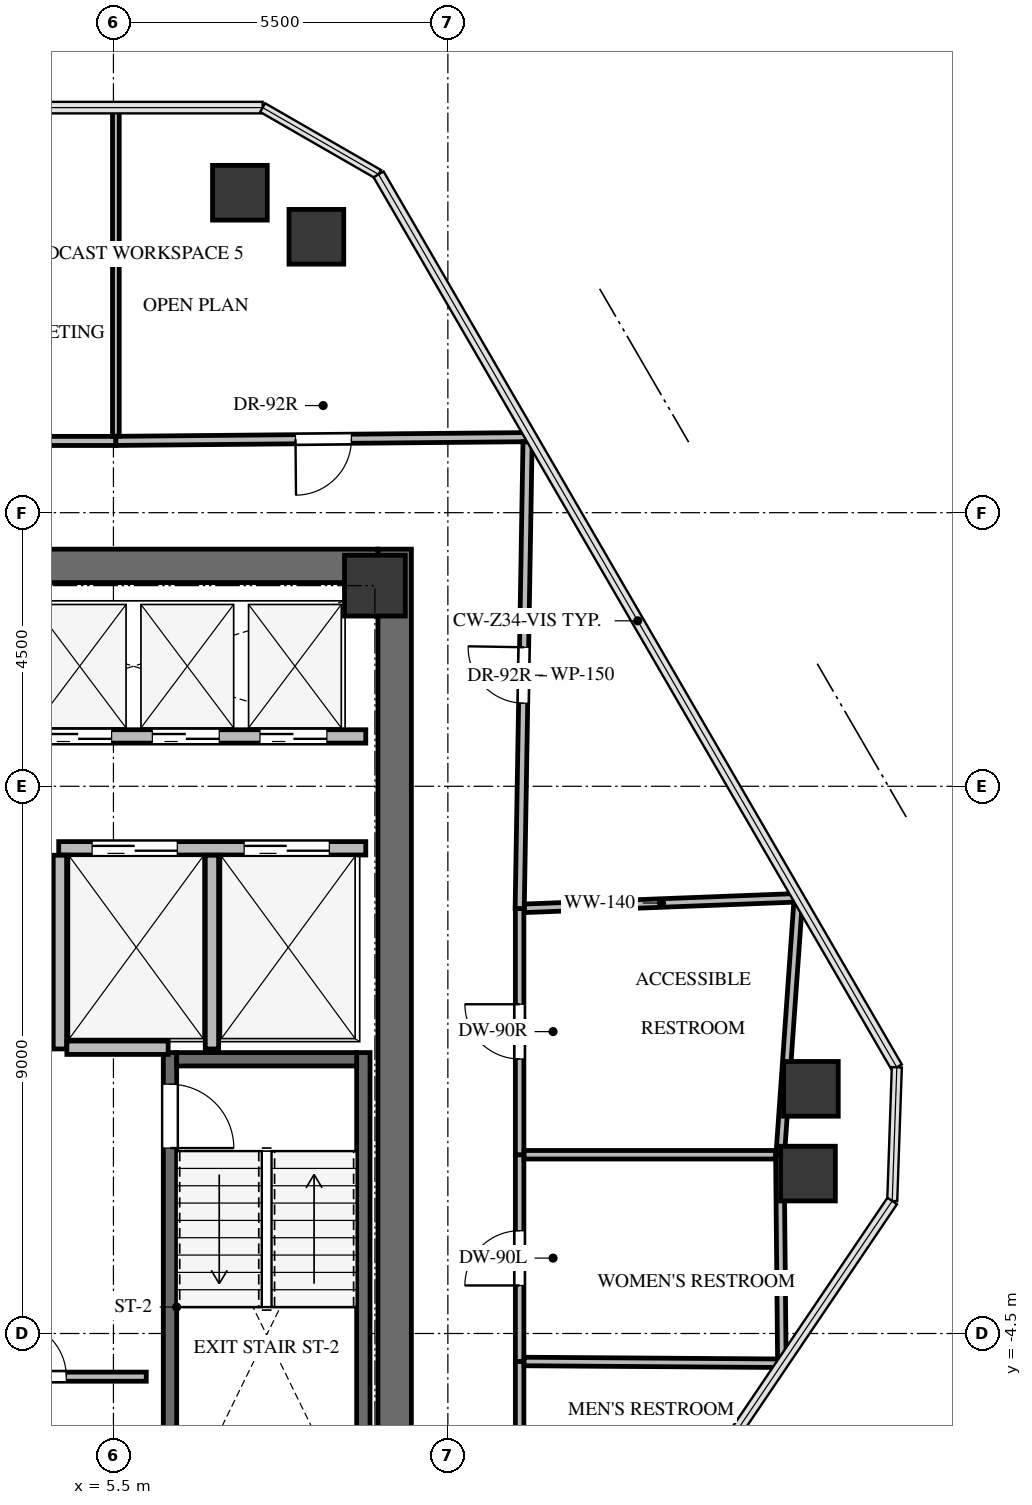
"""IFC4 building model, lengths in metres.
Left out: names, types, materials, properties, quantities, classifications, styles, units other than length and angle.
Written with IfcOpenShell. Run it as: python <this file> out.ifc"""

import sys

from ifc_helpers import new_model, si_unit, direction, frame, frame_2d, origin, origin_2d, place, context, subcontext, project, spatial, rectangle, extrude, source, transform, mapped, element, fill, save


model = new_model("IFC4")
c1 = context("Model", 3, precision=1e-05, world=origin(), true_north=direction((0.0, 1.0)))
c2 = subcontext(c1, "Body", "Model", "MODEL_VIEW")
j1 = project(units=[si_unit("LENGTHUNIT", "METRE"), si_unit("PLANEANGLEUNIT", "RADIAN")], contexts=[c1])
p1 = place(None, origin())
s1 = spatial("IfcSite", under=j1, at=p1, CompositionType="ELEMENT")
p2 = place(p1, origin())
s2 = spatial("IfcBuilding", under=s1, at=p2, CompositionType="ELEMENT")
p3 = place(p2, frame((0.0, 0.0, 251.3)))
s3 = spatial("IfcBuildingStorey", under=s2, at=p3, CompositionType="ELEMENT", Elevation=251.3)
p4 = place(p3, frame((10.125, -8.4, 0.0), z_axis=(0.0, 0.0, 1.0), x_axis=(0.0, 1.0, 0.0)))
e1 = element("IfcWall", 1, at=p4, inside=s3, PredefinedType="SHEAR", context=c2, shape_type="SweptSolid", body=[
    extrude(rectangle(XDim=16.8, YDim=0.55, at=frame_2d((8.4, 0.0))), origin(), (0.0, 0.0, 1.0), 3.4),
])
p5 = place(p3, frame((-9.85, 8.125, 0.0), z_axis=(0.0, 0.0, 1.0), x_axis=(1.0, 0.0, 0.0)))
e2 = element("IfcWall", 2, at=p5, inside=s3, PredefinedType="SHEAR", context=c2, shape_type="SweptSolid", body=[
    extrude(rectangle(XDim=19.7, YDim=0.55, at=frame_2d((9.85, 0.0))), origin(), (0.0, 0.0, 1.0), 3.4),
])
p6 = place(p3, frame((9.61, -7.77, -0.24), z_axis=(0.0, 0.0, 1.0), x_axis=(0.0, 1.0, 0.0)))
e3 = element("IfcWall", 3, at=p6, inside=s3, PredefinedType="SHEAR", context=c2, shape_type="SweptSolid", body=[
    extrude(rectangle(XDim=7.89, YDim=0.22, at=frame_2d((3.945, 0.0))), origin(), (0.0, 0.0, 1.0), 3.4),
])
p7 = place(p3, frame((6.43, 0.12, -0.24), z_axis=(0.0, 0.0, 1.0), x_axis=(0.0, -1.0, 0.0)))
e4 = element("IfcWall", 4, at=p7, inside=s3, PredefinedType="SHEAR", context=c2, shape_type="SweptSolid", body=[
    extrude(rectangle(XDim=7.89, YDim=0.22, at=frame_2d((3.945, 0.0))), origin(), (0.0, 0.0, 1.0), 3.4),
])
p8 = place(p7, frame((0.52, 0.0, 0.0)))
e5 = element("IfcOpeningElement", 5, at=p8, cuts=e4, PredefinedType="OPENING", context=c2, shape_type="SweptSolid", body=[
    extrude(rectangle(XDim=1.05, YDim=2.15, at=frame_2d((0.525, 1.075))), frame((0.0, 0.12, 0.0), z_axis=(0.0, -1.0, 0.0), x_axis=(1.0, 0.0, 0.0)), (0.0, 0.0, 1.0), 0.24),
])
p9 = place(p3, frame((9.5, 0.01, -0.24), z_axis=(0.0, 0.0, 1.0), x_axis=(-1.0, 0.0, 0.0)))
e6 = element("IfcWall", 6, at=p9, inside=s3, PredefinedType="SHEAR", context=c2, shape_type="SweptSolid", body=[
    extrude(rectangle(XDim=2.96, YDim=0.22, at=frame_2d((1.48, 0.0))), origin(), (0.0, 0.0, 1.0), 3.4),
])
m1 = source(origin(), c2, "Body", "SweptSolid", [
    extrude(rectangle(XDim=1.0, YDim=1.0, at=origin_2d()), origin(), (0.0, 0.0, 1.0), 3.4),
])
p10 = place(p3, frame((9.8, 7.8, -0.24), z_axis=(0.0, 0.0, 1.0), x_axis=(1.0, 0.0, 0.0)))
e7 = element("IfcColumn", 7, at=p10, inside=s3, PredefinedType="COLUMN", context=c2, shape_type="MappedRepresentation", body=[
    mapped(m1, transform((0.0, 0.0, 0.0), x_axis=(1.0, 0.0, 0.0), y_axis=(0.0, 1.0, 0.0), z_axis=(0.0, 0.0, 1.0), scale=1.0)),
])
m2 = source(origin(), c2, "Body", "SweptSolid", [
    extrude(rectangle(XDim=0.9, YDim=0.9, at=origin_2d()), origin(), (0.0, 0.0, 1.0), 3.4),
])
for number, where, z_axis, x_axis in (
    (8, (7.58, 14.262, -0.24), (0.0, 0.0, 1.0), (1.0, 0.0, 0.0)),
    (9, (8.837, 13.538, -0.24), (0.0, 0.0, 1.0), (1.0, 0.0, 0.0)),
    (10, (16.97, -0.476, -0.24), (0.0, 0.0, 1.0), (1.0, 0.0, 0.0)),
    (11, (16.922, -1.87, -0.24), (0.0, 0.0, 1.0), (1.0, 0.0, 0.0)),
):
    element("IfcColumn", number, at=place(p3, frame(where, z_axis=z_axis, x_axis=x_axis)), inside=s3, PredefinedType="COLUMN", context=c2, shape_type="MappedRepresentation", body=[
        mapped(m2, transform((0.0, 0.0, 0.0), x_axis=(1.0, 0.0, 0.0), y_axis=(0.0, 1.0, 0.0), z_axis=(0.0, 0.0, 1.0), scale=1.0)),
    ])
p11 = place(p3, frame((4.6, 3.48, 0.0), z_axis=(0.0, 0.0, 1.0), x_axis=(1.0, 0.0, 0.0)))
e12 = element("IfcWall", 12, at=p11, inside=s3, PredefinedType="SOLIDWALL", context=c2, shape_type="SweptSolid", body=[
    extrude(rectangle(XDim=5.05, YDim=0.22, at=frame_2d((2.525, 0.0))), origin(), (0.0, 0.0, 1.0), 3.145),
])
p12 = place(p11, frame((0.55, 0.0, 0.0)))
e13 = element("IfcOpeningElement", 13, at=p12, cuts=e12, PredefinedType="OPENING", context=c2, shape_type="SweptSolid", body=[
    extrude(rectangle(XDim=1.4, YDim=2.15, at=frame_2d((0.7, 1.075))), frame((0.0, 0.12, 0.0), z_axis=(0.0, -1.0, 0.0), x_axis=(1.0, 0.0, 0.0)), (0.0, 0.0, 1.0), 0.24),
])
p13 = place(p11, frame((3.05, 0.0, 0.0)))
e14 = element("IfcOpeningElement", 14, at=p13, cuts=e12, PredefinedType="OPENING", context=c2, shape_type="SweptSolid", body=[
    extrude(rectangle(XDim=1.4, YDim=2.15, at=frame_2d((0.7, 1.075))), frame((0.0, 0.12, 0.0), z_axis=(0.0, -1.0, 0.0), x_axis=(1.0, 0.0, 0.0)), (0.0, 0.0, 1.0), 0.24),
])
for number, where, z_axis, x_axis in (
    (15, (4.62, 0.18, 0.0), (0.0, 0.0, 1.0), (0.0, 1.0, 0.0)),
    (16, (7.12, 0.18, 0.0), (0.0, 0.0, 1.0), (0.0, 1.0, 0.0)),
):
    element("IfcWall", number, at=place(p3, frame(where, z_axis=z_axis, x_axis=x_axis)), inside=s3, PredefinedType="SOLIDWALL", context=c2, shape_type="SweptSolid", body=[
        extrude(rectangle(XDim=3.186, YDim=0.22, at=frame_2d((1.593, 0.0))), origin(), (0.0, 0.0, 1.0), 3.145),
    ])
p14 = place(p3, frame((4.734, 0.2, 0.0), z_axis=(0.0, 0.0, 1.0), x_axis=(1.0, 0.0, 0.0)))
e17 = element("IfcWall", 17, at=p14, inside=s3, PredefinedType="SOLIDWALL", context=c2, shape_type="SweptSolid", body=[
    extrude(rectangle(XDim=1.666, YDim=0.22, at=frame_2d((0.833, 0.0))), origin(), (0.0, 0.0, 1.0), 3.145),
])
p15 = place(p3, frame((2.325, 5.32, 0.0), z_axis=(0.0, 0.0, 1.0), x_axis=(1.0, 0.0, 0.0)))
e18 = element("IfcWall", 18, at=p15, inside=s3, PredefinedType="SOLIDWALL", context=c2, shape_type="SweptSolid", body=[
    extrude(rectangle(XDim=7.325, YDim=0.22, at=frame_2d((3.663, 0.0))), origin(), (0.0, 0.0, 1.0), 3.145),
])
p16 = place(p15, frame((0.275, 0.0, 0.0)))
e19 = element("IfcOpeningElement", 19, at=p16, cuts=e18, PredefinedType="OPENING", context=c2, shape_type="SweptSolid", body=[
    extrude(rectangle(XDim=1.1, YDim=2.15, at=frame_2d((0.55, 1.075))), frame((0.0, 0.12, 0.0), z_axis=(0.0, -1.0, 0.0), x_axis=(1.0, 0.0, 0.0)), (0.0, 0.0, 1.0), 0.24),
])
p17 = place(p15, frame((2.045, 0.0, 0.0)))
e20 = element("IfcOpeningElement", 20, at=p17, cuts=e18, PredefinedType="OPENING", context=c2, shape_type="SweptSolid", body=[
    extrude(rectangle(XDim=1.1, YDim=2.15, at=frame_2d((0.55, 1.075))), frame((0.0, 0.12, 0.0), z_axis=(0.0, -1.0, 0.0), x_axis=(1.0, 0.0, 0.0)), (0.0, 0.0, 1.0), 0.24),
])
p18 = place(p15, frame((3.815, 0.0, 0.0)))
e21 = element("IfcOpeningElement", 21, at=p18, cuts=e18, PredefinedType="OPENING", context=c2, shape_type="SweptSolid", body=[
    extrude(rectangle(XDim=1.1, YDim=2.15, at=frame_2d((0.55, 1.075))), frame((0.0, 0.12, 0.0), z_axis=(0.0, -1.0, 0.0), x_axis=(1.0, 0.0, 0.0)), (0.0, 0.0, 1.0), 0.24),
])
p19 = place(p15, frame((5.585, 0.0, 0.0)))
e22 = element("IfcOpeningElement", 22, at=p19, cuts=e18, PredefinedType="OPENING", context=c2, shape_type="SweptSolid", body=[
    extrude(rectangle(XDim=1.1, YDim=2.15, at=frame_2d((0.55, 1.075))), frame((0.0, 0.12, 0.0), z_axis=(0.0, -1.0, 0.0), x_axis=(1.0, 0.0, 0.0)), (0.0, 0.0, 1.0), 0.24),
])
p20 = place(p3, frame((2.51, -5.21, 0.0), z_axis=(0.0, 0.0, 1.0), x_axis=(1.0, 0.0, 0.0)))
e23 = element("IfcWall", 23, at=p20, inside=s3, PredefinedType="PARTITIONING", context=c2, shape_type="SweptSolid", body=[
    extrude(rectangle(XDim=3.53, YDim=0.15, at=frame_2d((1.765, 0.0))), origin(), (0.0, 0.0, 1.0), 3.145),
])
p21 = place(p20, frame((1.315, 0.0, 0.0)))
e24 = element("IfcOpeningElement", 24, at=p21, cuts=e23, PredefinedType="OPENING", context=c2, shape_type="SweptSolid", body=[
    extrude(rectangle(XDim=0.9, YDim=2.05, at=frame_2d((0.45, 1.025))), frame((0.0, 0.085, 0.0), z_axis=(0.0, -1.0, 0.0), x_axis=(1.0, 0.0, 0.0)), (0.0, 0.0, 1.0), 0.17),
])
p22 = place(p3, frame((12.18, -8.44, 0.0), z_axis=(0.0, 0.0, 1.0), x_axis=(0.0, 1.0, 0.0)))
e25 = element("IfcWall", 25, at=p22, inside=s3, PredefinedType="PARTITIONING", context=c2, shape_type="SweptSolid", body=[
    extrude(rectangle(XDim=3.48, YDim=0.14, at=frame_2d((1.74, 0.0))), origin(), (0.0, 0.0, 1.0), 2.499),
])
p23 = place(p22, frame((1.29, 0.0, 0.0)))
e26 = element("IfcOpeningElement", 26, at=p23, cuts=e25, PredefinedType="OPENING", context=c2, shape_type="SweptSolid", body=[
    extrude(rectangle(XDim=0.9, YDim=2.05, at=frame_2d((0.45, 1.025))), frame((0.0, 0.08, 0.0), z_axis=(0.0, -1.0, 0.0), x_axis=(1.0, 0.0, 0.0)), (0.0, 0.0, 1.0), 0.16),
])
p24 = place(p3, frame((12.18, -4.96, 0.0), z_axis=(0.0, 0.0, 1.0), x_axis=(0.0, 1.0, 0.0)))
e27 = element("IfcWall", 27, at=p24, inside=s3, PredefinedType="PARTITIONING", context=c2, shape_type="SweptSolid", body=[
    extrude(rectangle(XDim=3.4, YDim=0.14, at=frame_2d((1.7, 0.0))), origin(), (0.0, 0.0, 1.0), 3.145),
])
p25 = place(p24, frame((1.25, 0.0, 0.0)))
e28 = element("IfcOpeningElement", 28, at=p25, cuts=e27, PredefinedType="OPENING", context=c2, shape_type="SweptSolid", body=[
    extrude(rectangle(XDim=0.9, YDim=2.05, at=frame_2d((0.45, 1.025))), frame((0.0, 0.08, 0.0), z_axis=(0.0, -1.0, 0.0), x_axis=(1.0, 0.0, 0.0)), (0.0, 0.0, 1.0), 0.16),
])
p26 = place(p3, frame((12.18, -1.56, 0.0), z_axis=(0.0, 0.0, 1.0), x_axis=(0.0, 1.0, 0.0)))
e29 = element("IfcWall", 29, at=p26, inside=s3, PredefinedType="PARTITIONING", context=c2, shape_type="SweptSolid", body=[
    extrude(rectangle(XDim=4.05, YDim=0.14, at=frame_2d((2.025, 0.0))), origin(), (0.0, 0.0, 1.0), 2.401),
])
p27 = place(p26, frame((1.575, 0.0, 0.0)))
e30 = element("IfcOpeningElement", 30, at=p27, cuts=e29, PredefinedType="OPENING", context=c2, shape_type="SweptSolid", body=[
    extrude(rectangle(XDim=0.9, YDim=2.05, at=frame_2d((0.45, 1.025))), frame((0.0, 0.08, 0.0), z_axis=(0.0, -1.0, 0.0), x_axis=(1.0, 0.0, 0.0)), (0.0, 0.0, 1.0), 0.16),
])
p28 = place(p3, frame((5.54, 10.18, 0.0), z_axis=(0.0, 0.0, 1.0), x_axis=(-1.0, 0.0, 0.0)))
e31 = element("IfcWall", 31, at=p28, inside=s3, PredefinedType="PARTITIONING", context=c2, shape_type="SweptSolid", body=[
    extrude(rectangle(XDim=4.451, YDim=0.15, at=frame_2d((2.226, 0.0))), origin(), (0.0, 0.0, 1.0), 2.708),
])
p29 = place(p3, frame((12.368, 10.243, 0.0), z_axis=(0.0, 0.0, 1.0), x_axis=(-0.999958440586, -0.009116858034, 0.0)))
e32 = element("IfcWall", 32, at=p29, inside=s3, PredefinedType="PARTITIONING", context=c2, shape_type="SweptSolid", body=[
    extrude(rectangle(XDim=6.829, YDim=0.15, at=frame_2d((3.414, 0.0))), origin(), (0.0, 0.0, 1.0), 2.401),
])
p30 = place(p29, frame((2.954, 0.0, 0.0)))
e33 = element("IfcOpeningElement", 33, at=p30, cuts=e32, PredefinedType="OPENING", context=c2, shape_type="SweptSolid", body=[
    extrude(rectangle(XDim=0.92, YDim=2.1, at=frame_2d((0.46, 1.05))), frame((0.0, 0.085, 0.0), z_axis=(0.0, -1.0, 0.0), x_axis=(1.0, 0.0, 0.0)), (0.0, 0.0, 1.0), 0.17),
])
p31 = place(p3, frame((12.181, 2.49, 0.0), z_axis=(0.0, 0.0, 1.0), x_axis=(0.016828669653, 0.999858387912, 0.0)))
e34 = element("IfcWall", 34, at=p31, inside=s3, PredefinedType="PARTITIONING", context=c2, shape_type="SweptSolid", body=[
    extrude(rectangle(XDim=7.674, YDim=0.15, at=frame_2d((3.837, 0.0))), origin(), (0.0, 0.0, 1.0), 2.499),
])
p32 = place(p31, frame((3.377, 0.0, 0.0)))
e35 = element("IfcOpeningElement", 35, at=p32, cuts=e34, PredefinedType="OPENING", context=c2, shape_type="SweptSolid", body=[
    extrude(rectangle(XDim=0.92, YDim=2.1, at=frame_2d((0.46, 1.05))), frame((0.0, 0.085, 0.0), z_axis=(0.0, -1.0, 0.0), x_axis=(1.0, 0.0, 0.0)), (0.0, 0.0, 1.0), 0.17),
])
p33 = place(p3, frame((12.254, -4.96, 0.0), z_axis=(0.0, 0.0, 1.0), x_axis=(0.999976630429, -0.006836563198, 0.0)))
e36 = element("IfcWall", 36, at=p33, inside=s3, PredefinedType="PARTITIONING", context=c2, shape_type="SweptSolid", body=[
    extrude(rectangle(XDim=4.25, YDim=0.14, at=frame_2d((2.125, 0.0))), origin(), (0.0, 0.0, 1.0), 2.499),
])
p34 = place(p3, frame((12.254, -1.56, 0.0), z_axis=(0.0, 0.0, 1.0), x_axis=(1.0, 0.0, 0.0)))
e37 = element("IfcWall", 37, at=p34, inside=s3, PredefinedType="PARTITIONING", context=c2, shape_type="SweptSolid", body=[
    extrude(rectangle(XDim=4.206, YDim=0.14, at=frame_2d((2.103, 0.0))), origin(), (0.0, 0.0, 1.0), 2.401),
])
p35 = place(p3, frame((16.46, -1.56, 0.0), z_axis=(0.0, 0.0, 1.0), x_axis=(0.009604446748, -0.999953876238, 0.0)))
e38 = element("IfcWall", 38, at=p35, inside=s3, PredefinedType="PARTITIONING", context=c2, shape_type="SweptSolid", body=[
    extrude(rectangle(XDim=3.355, YDim=0.14, at=frame_2d((1.678, 0.0))), origin(), (0.0, 0.0, 1.0), 2.401),
])
p36 = place(p3, frame((12.26, 2.493, 0.0), z_axis=(0.0, 0.0, 1.0), x_axis=(0.999256206289, 0.038562082324, 0.0)))
e39 = element("IfcWall", 39, at=p36, inside=s3, PredefinedType="PARTITIONING", context=c2, shape_type="SweptSolid", body=[
    extrude(rectangle(XDim=4.508, YDim=0.14, at=frame_2d((2.254, 0.0))), origin(), (0.0, 0.0, 1.0), 2.499),
])
p37 = place(p3, frame((16.76, 2.593, 0.0), z_axis=(0.0, 0.0, 1.0), x_axis=(-0.07055102187, -0.997508172053, 0.0)))
e40 = element("IfcWall", 40, at=p37, inside=s3, PredefinedType="PARTITIONING", context=c2, shape_type="SweptSolid", body=[
    extrude(rectangle(XDim=4.163, YDim=0.14, at=frame_2d((2.082, 0.0))), origin(), (0.0, 0.0, 1.0), 2.401),
])
p38 = place(p3, frame((5.54, 15.662, 0.0), z_axis=(0.0, 0.0, 1.0), x_axis=(0.0, -1.0, 0.0)))
e41 = element("IfcWall", 41, at=p38, inside=s3, PredefinedType="MOVABLE", context=c2, shape_type="SweptSolid", body=[
    extrude(rectangle(XDim=5.402, YDim=0.11, at=frame_2d((2.701, 0.0))), origin(), (0.0, 0.0, 1.0), 2.499),
])
m3 = source(origin(), c2, "Body", "SweptSolid", [
    extrude(rectangle(XDim=1.05, YDim=2.15, at=frame_2d((0.525, 1.075))), frame((0.0, 0.025, 0.0), z_axis=(0.0, -1.0, 0.0), x_axis=(1.0, 0.0, 0.0)), (0.0, 0.0, 1.0), 0.05),
])
p39 = place(p8, origin())
e42 = element("IfcDoor", 42, at=p39, inside=s3, OperationType="SINGLE_SWING_RIGHT", PredefinedType="DOOR", context=c2, shape_type="MappedRepresentation", body=[
    mapped(m3, transform((0.0, 0.0, 0.0), x_axis=(1.0, 0.0, 0.0), y_axis=(0.0, 1.0, 0.0), z_axis=(0.0, 0.0, 1.0), scale=1.0)),
])
fill(e5, e42)
m4 = source(origin(), c2, "Body", "SweptSolid", [
    extrude(rectangle(XDim=1.4, YDim=2.15, at=frame_2d((0.7, 1.075))), frame((0.0, 0.025, 0.0), z_axis=(0.0, -1.0, 0.0), x_axis=(1.0, 0.0, 0.0)), (0.0, 0.0, 1.0), 0.05),
])
p40 = place(p12, origin())
e43 = element("IfcDoor", 43, at=p40, inside=s3, OperationType="DOUBLE_DOOR_SLIDING", PredefinedType="DOOR", context=c2, shape_type="MappedRepresentation", body=[
    mapped(m4, transform((0.0, 0.0, 0.0), x_axis=(1.0, 0.0, 0.0), y_axis=(0.0, 1.0, 0.0), z_axis=(0.0, 0.0, 1.0), scale=1.0)),
])
fill(e13, e43)
p41 = place(p13, origin())
e44 = element("IfcDoor", 44, at=p41, inside=s3, OperationType="DOUBLE_DOOR_SLIDING", PredefinedType="DOOR", context=c2, shape_type="MappedRepresentation", body=[
    mapped(m4, transform((0.0, 0.0, 0.0), x_axis=(1.0, 0.0, 0.0), y_axis=(0.0, 1.0, 0.0), z_axis=(0.0, 0.0, 1.0), scale=1.0)),
])
fill(e14, e44)
m5 = source(origin(), c2, "Body", "SweptSolid", [
    extrude(rectangle(XDim=1.1, YDim=2.15, at=frame_2d((0.55, 1.075))), frame((0.0, 0.025, 0.0), z_axis=(0.0, -1.0, 0.0), x_axis=(1.0, 0.0, 0.0)), (0.0, 0.0, 1.0), 0.05),
])
p42 = place(p17, origin())
e45 = element("IfcDoor", 45, at=p42, inside=s3, OperationType="DOUBLE_DOOR_SLIDING", PredefinedType="DOOR", context=c2, shape_type="MappedRepresentation", body=[
    mapped(m5, transform((0.0, 0.0, 0.0), x_axis=(1.0, 0.0, 0.0), y_axis=(0.0, 1.0, 0.0), z_axis=(0.0, 0.0, 1.0), scale=1.0)),
])
fill(e20, e45)
p43 = place(p18, origin())
e46 = element("IfcDoor", 46, at=p43, inside=s3, OperationType="DOUBLE_DOOR_SLIDING", PredefinedType="DOOR", context=c2, shape_type="MappedRepresentation", body=[
    mapped(m5, transform((0.0, 0.0, 0.0), x_axis=(1.0, 0.0, 0.0), y_axis=(0.0, 1.0, 0.0), z_axis=(0.0, 0.0, 1.0), scale=1.0)),
])
fill(e21, e46)
p44 = place(p19, origin())
e47 = element("IfcDoor", 47, at=p44, inside=s3, OperationType="DOUBLE_DOOR_SLIDING", PredefinedType="DOOR", context=c2, shape_type="MappedRepresentation", body=[
    mapped(m5, transform((0.0, 0.0, 0.0), x_axis=(1.0, 0.0, 0.0), y_axis=(0.0, 1.0, 0.0), z_axis=(0.0, 0.0, 1.0), scale=1.0)),
])
fill(e22, e47)
m6 = source(origin(), c2, "Body", "SweptSolid", [
    extrude(rectangle(XDim=0.9, YDim=2.05, at=frame_2d((0.45, 1.025))), frame((0.0, 0.025, 0.0), z_axis=(0.0, -1.0, 0.0), x_axis=(1.0, 0.0, 0.0)), (0.0, 0.0, 1.0), 0.05),
])
p45 = place(p21, origin())
e48 = element("IfcDoor", 48, at=p45, inside=s3, OperationType="SINGLE_SWING_LEFT", PredefinedType="DOOR", context=c2, shape_type="MappedRepresentation", body=[
    mapped(m6, transform((0.0, 0.0, 0.0), x_axis=(1.0, 0.0, 0.0), y_axis=(0.0, 1.0, 0.0), z_axis=(0.0, 0.0, 1.0), scale=1.0)),
])
fill(e24, e48)
m7 = source(origin(), c2, "Body", "SweptSolid", [
    extrude(rectangle(XDim=0.9, YDim=2.05, at=frame_2d((0.45, 1.025))), frame((0.0, 0.025, 0.0), z_axis=(0.0, -1.0, 0.0), x_axis=(1.0, 0.0, 0.0)), (0.0, 0.0, 1.0), 0.05),
])
p46 = place(p25, origin())
e49 = element("IfcDoor", 49, at=p46, inside=s3, OperationType="SINGLE_SWING_LEFT", PredefinedType="DOOR", context=c2, shape_type="MappedRepresentation", body=[
    mapped(m7, transform((0.0, 0.0, 0.0), x_axis=(1.0, 0.0, 0.0), y_axis=(0.0, 1.0, 0.0), z_axis=(0.0, 0.0, 1.0), scale=1.0)),
])
fill(e28, e49)
m8 = source(origin(), c2, "Body", "SweptSolid", [
    extrude(rectangle(XDim=0.9, YDim=2.05, at=frame_2d((0.45, 1.025))), frame((0.0, 0.025, 0.0), z_axis=(0.0, -1.0, 0.0), x_axis=(1.0, 0.0, 0.0)), (0.0, 0.0, 1.0), 0.05),
])
p47 = place(p27, origin())
e50 = element("IfcDoor", 50, at=p47, inside=s3, OperationType="SINGLE_SWING_RIGHT", PredefinedType="DOOR", context=c2, shape_type="MappedRepresentation", body=[
    mapped(m8, transform((0.0, 0.0, 0.0), x_axis=(1.0, 0.0, 0.0), y_axis=(0.0, 1.0, 0.0), z_axis=(0.0, 0.0, 1.0), scale=1.0)),
])
fill(e30, e50)
m9 = source(origin(), c2, "Body", "SweptSolid", [
    extrude(rectangle(XDim=0.92, YDim=2.1, at=frame_2d((0.46, 1.05))), frame((0.0, 0.025, 0.0), z_axis=(0.0, -1.0, 0.0), x_axis=(1.0, 0.0, 0.0)), (0.0, 0.0, 1.0), 0.05),
])
p48 = place(p30, origin())
e51 = element("IfcDoor", 51, at=p48, inside=s3, OperationType="SINGLE_SWING_RIGHT", PredefinedType="DOOR", context=c2, shape_type="MappedRepresentation", body=[
    mapped(m9, transform((0.0, 0.0, 0.0), x_axis=(1.0, 0.0, 0.0), y_axis=(0.0, 1.0, 0.0), z_axis=(0.0, 0.0, 1.0), scale=1.0)),
])
fill(e33, e51)
p49 = place(p32, origin())
e52 = element("IfcDoor", 52, at=p49, inside=s3, OperationType="SINGLE_SWING_RIGHT", PredefinedType="DOOR", context=c2, shape_type="MappedRepresentation", body=[
    mapped(m9, transform((0.0, 0.0, 0.0), x_axis=(1.0, 0.0, 0.0), y_axis=(0.0, 1.0, 0.0), z_axis=(0.0, 0.0, 1.0), scale=1.0)),
])
fill(e35, e52)
save(model, sys.argv[1])
